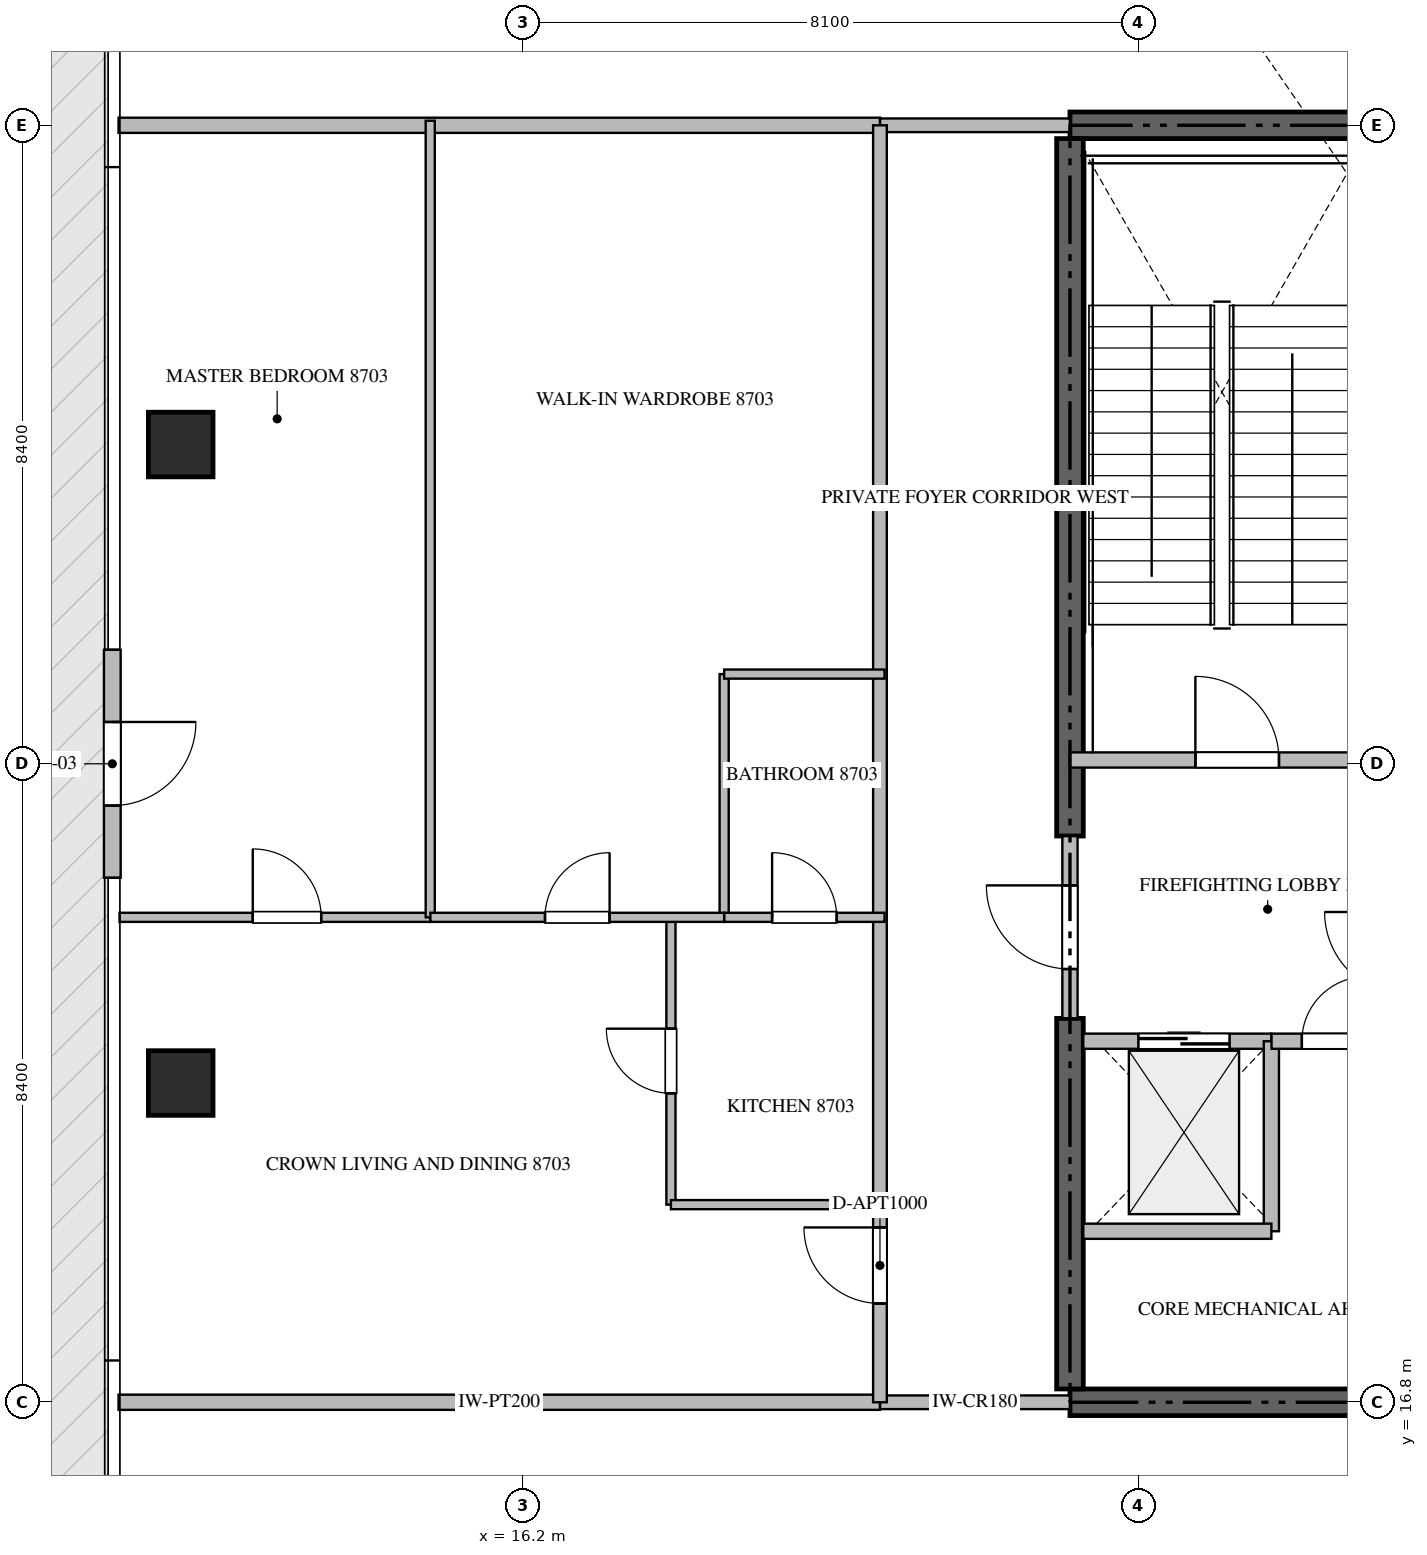
"""IFC4 building model, lengths in metres.
Left out: names, types, materials, properties, quantities, classifications, styles, units other than length and angle.
Written with IfcOpenShell. Run it as: python <this file> out.ifc"""

import sys

from ifc_helpers import new_model, si_unit, direction, frame, frame_2d, origin, origin_2d, place, context, subcontext, project, spatial, rectangle, extrude, source, transform, mapped, element, fill, save


model = new_model("IFC4")
c1 = context("Model", 3, precision=1e-05, world=origin(), true_north=direction((0.0, 1.0)))
c2 = subcontext(c1, "Body", "Model", "MODEL_VIEW")
j1 = project(units=[si_unit("LENGTHUNIT", "METRE"), si_unit("PLANEANGLEUNIT", "RADIAN")], contexts=[c1])
p1 = place(None, origin())
s1 = spatial("IfcSite", under=j1, at=p1, CompositionType="ELEMENT")
p2 = place(p1, origin())
s2 = spatial("IfcBuilding", under=s1, at=p2, CompositionType="ELEMENT")
p3 = place(p2, frame((0.0, 0.0, 353.85)))
s3 = spatial("IfcBuildingStorey", under=s2, at=p3, CompositionType="ELEMENT", Elevation=353.85)
for number, where, z_axis, x_axis in (
    (1, (23.4, 16.8, -0.26), (0.0, 0.0, 1.0), (1.0, 0.0, 0.0)),
    (2, (41.4, 33.6, -0.26), (0.0, 0.0, 1.0), (-1.0, 0.0, 0.0)),
):
    element("IfcWall", number, at=place(p3, frame(where, z_axis=z_axis, x_axis=x_axis)), inside=s3, PredefinedType="SHEAR", context=c2, shape_type="SweptSolid", body=[
        extrude(rectangle(XDim=18.0, YDim=0.35, at=frame_2d((9.0, 0.0))), origin(), (0.0, 0.0, 1.0), 5.798),
    ])
p4 = place(p3, frame((23.4, 16.975, -0.26), z_axis=(0.0, 0.0, 1.0), x_axis=(0.0, 1.0, 0.0)))
e3 = element("IfcWall", 3, at=p4, inside=s3, PredefinedType="SHEAR", context=c2, shape_type="SweptSolid", body=[
    extrude(rectangle(XDim=4.875, YDim=0.35, at=frame_2d((2.438, 0.0))), origin(), (0.0, 0.0, 1.0), 5.798),
])
p5 = place(p3, frame((23.4, 24.25, -0.26), z_axis=(0.0, 0.0, 1.0), x_axis=(0.0, 1.0, 0.0)))
e4 = element("IfcWall", 4, at=p5, inside=s3, PredefinedType="SHEAR", context=c2, shape_type="SweptSolid", body=[
    extrude(rectangle(XDim=9.175, YDim=0.35, at=frame_2d((4.587, 0.0))), origin(), (0.0, 0.0, 1.0), 5.798),
])
m1 = source(origin(), c2, "Body", "SweptSolid", [
    extrude(rectangle(XDim=0.85, YDim=0.85, at=origin_2d()), origin(), (0.0, 0.0, 1.0), 5.8),
])
for number, where, z_axis, x_axis in (
    (5, (11.7, 21.0, -0.26), (0.0, 0.0, 1.0), (1.0, 0.0, 0.0)),
    (6, (11.7, 29.4, -0.26), (0.0, 0.0, 1.0), (1.0, 0.0, 0.0)),
):
    element("IfcColumn", number, at=place(p3, frame(where, z_axis=z_axis, x_axis=x_axis)), inside=s3, PredefinedType="COLUMN", context=c2, shape_type="MappedRepresentation", body=[
        mapped(m1, transform((0.0, 0.0, 0.0), scale=1.0)),
    ])
p6 = place(p3, frame((10.8, 26.7, 0.0), z_axis=(0.0, 0.0, 1.0), x_axis=(0.0, -1.0, 0.0)))
e7 = element("IfcWall", 7, at=p6, inside=s3, PredefinedType="ELEMENTEDWALL", context=c2, shape_type="SweptSolid", body=[
    extrude(rectangle(XDim=3.0, YDim=0.22, at=frame_2d((1.5, 0.0))), origin(), (0.0, 0.0, 1.0), 5.525),
])
p7 = place(p6, frame((0.95, 0.0, 0.0)))
e8 = element("IfcOpeningElement", 8, at=p7, cuts=e7, PredefinedType="OPENING", context=c2, shape_type="SweptSolid", body=[
    extrude(rectangle(XDim=1.1, YDim=2.2, at=frame_2d((0.55, 1.1))), frame((0.0, 0.12, 0.0), z_axis=(0.0, -1.0, 0.0), x_axis=(1.0, 0.0, 0.0)), (0.0, 0.0, 1.0), 0.24),
])
p8 = place(p3, frame((23.4, 25.25, 0.0), z_axis=(0.0, 0.0, 1.0), x_axis=(1.0, 0.0, 0.0)))
e9 = element("IfcWall", 9, at=p8, inside=s3, PredefinedType="STANDARD", context=c2, shape_type="SweptSolid", body=[
    extrude(rectangle(XDim=4.45, YDim=0.2, at=frame_2d((2.225, 0.0))), origin(), (0.0, 0.0, 1.0), 5.54),
])
p9 = place(p8, frame((1.65, 0.0, 0.0)))
e10 = element("IfcOpeningElement", 10, at=p9, cuts=e9, PredefinedType="OPENING", context=c2, shape_type="SweptSolid", body=[
    extrude(rectangle(XDim=1.1, YDim=2.15, at=frame_2d((0.55, 1.075))), frame((0.0, 0.11, 0.0), z_axis=(0.0, -1.0, 0.0), x_axis=(1.0, 0.0, 0.0)), (0.0, 0.0, 1.0), 0.22),
])
p10 = place(p3, frame((23.575, 21.55, 0.0), z_axis=(0.0, 0.0, 1.0), x_axis=(1.0, 0.0, 0.0)))
e11 = element("IfcWall", 11, at=p10, inside=s3, PredefinedType="STANDARD", context=c2, shape_type="SweptSolid", body=[
    extrude(rectangle(XDim=2.475, YDim=0.2, at=frame_2d((1.238, 0.0))), origin(), (0.0, 0.0, 1.0), 5.54),
])
p11 = place(p10, frame((0.725, 0.0, 0.0)))
e12 = element("IfcOpeningElement", 12, at=p11, cuts=e11, PredefinedType="OPENING", context=c2, shape_type="SweptSolid", body=[
    extrude(rectangle(XDim=1.2, YDim=2.2, at=frame_2d((0.6, 1.1))), frame((0.0, 0.11, 0.0), z_axis=(0.0, -1.0, 0.0), x_axis=(1.0, 0.0, 0.0)), (0.0, 0.0, 1.0), 0.22),
])
p12 = place(p3, frame((26.05, 19.05, 0.0), z_axis=(0.0, 0.0, 1.0), x_axis=(0.0, 1.0, 0.0)))
e13 = element("IfcWall", 13, at=p12, inside=s3, PredefinedType="STANDARD", context=c2, shape_type="SweptSolid", body=[
    extrude(rectangle(XDim=2.5, YDim=0.2, at=frame_2d((1.25, 0.0))), origin(), (0.0, 0.0, 1.0), 5.54),
])
p13 = place(p3, frame((23.575, 19.05, 0.0), z_axis=(0.0, 0.0, 1.0), x_axis=(1.0, 0.0, 0.0)))
e14 = element("IfcWall", 14, at=p13, inside=s3, PredefinedType="STANDARD", context=c2, shape_type="SweptSolid", body=[
    extrude(rectangle(XDim=2.475, YDim=0.2, at=frame_2d((1.238, 0.0))), origin(), (0.0, 0.0, 1.0), 5.54),
])
p14 = place(p3, frame((26.052, 21.55, 0.0), z_axis=(0.0, 0.0, 1.0), x_axis=(1.0, 0.0, 0.0)))
e15 = element("IfcWall", 15, at=p14, inside=s3, PredefinedType="STANDARD", context=c2, shape_type="SweptSolid", body=[
    extrude(rectangle(XDim=1.648, YDim=0.2, at=frame_2d((0.824, 0.0))), origin(), (0.0, 0.0, 1.0), 5.54),
])
p15 = place(p14, frame((0.399, 0.0, 0.0)))
e16 = element("IfcOpeningElement", 16, at=p15, cuts=e15, PredefinedType="OPENING", context=c2, shape_type="SweptSolid", body=[
    extrude(rectangle(XDim=0.85, YDim=2.1, at=frame_2d((0.425, 1.05))), frame((0.0, 0.11, 0.0), z_axis=(0.0, -1.0, 0.0), x_axis=(1.0, 0.0, 0.0)), (0.0, 0.0, 1.0), 0.22),
])
p16 = place(p3, frame((23.4, 21.852, 0.0), z_axis=(0.0, 0.0, 1.0), x_axis=(0.0, 1.0, 0.0)))
e17 = element("IfcWall", 17, at=p16, inside=s3, PredefinedType="STANDARD", context=c2, shape_type="SweptSolid", body=[
    extrude(rectangle(XDim=2.396, YDim=0.2, at=frame_2d((1.198, 0.0))), origin(), (0.0, 0.0, 1.0), 5.54),
])
p17 = place(p16, frame((0.648, 0.0, 0.0)))
e18 = element("IfcOpeningElement", 18, at=p17, cuts=e17, PredefinedType="OPENING", context=c2, shape_type="SweptSolid", body=[
    extrude(rectangle(XDim=1.1, YDim=2.15, at=frame_2d((0.55, 1.075))), frame((0.0, 0.11, 0.0), z_axis=(0.0, -1.0, 0.0), x_axis=(1.0, 0.0, 0.0)), (0.0, 0.0, 1.0), 0.22),
])
for number, where, z_axis, x_axis in (
    (19, (10.882, 16.8, 0.0), (0.0, 0.0, 1.0), (1.0, 0.0, 0.0)),
    (20, (10.882, 33.6, 0.0), (0.0, 0.0, 1.0), (1.0, 0.0, 0.0)),
):
    element("IfcWall", number, at=place(p3, frame(where, z_axis=z_axis, x_axis=x_axis)), inside=s3, PredefinedType="PARTITIONING", context=c2, shape_type="SweptSolid", body=[
        extrude(rectangle(XDim=10.018, YDim=0.2, at=frame_2d((5.009, 0.0))), origin(), (0.0, 0.0, 1.0), 5.54),
    ])
for number, where, z_axis, x_axis in (
    (21, (20.902, 16.8, 0.0), (0.0, 0.0, 1.0), (1.0, 0.0, 0.0)),
    (22, (20.902, 33.6, 0.0), (0.0, 0.0, 1.0), (1.0, 0.0, 0.0)),
):
    element("IfcWall", number, at=place(p3, frame(where, z_axis=z_axis, x_axis=x_axis)), inside=s3, PredefinedType="PARTITIONING", context=c2, shape_type="SweptSolid", body=[
        extrude(rectangle(XDim=2.496, YDim=0.18, at=frame_2d((1.248, 0.0))), origin(), (0.0, 0.0, 1.0), 5.54),
    ])
p18 = place(p3, frame((20.9, 16.8, 0.0), z_axis=(0.0, 0.0, 1.0), x_axis=(0.0, 1.0, 0.0)))
e23 = element("IfcWall", 23, at=p18, inside=s3, PredefinedType="PARTITIONING", context=c2, shape_type="SweptSolid", body=[
    extrude(rectangle(XDim=16.8, YDim=0.18, at=frame_2d((8.4, 0.0))), origin(), (0.0, 0.0, 1.0), 5.54),
])
p19 = place(p18, frame((1.3, 0.0, 0.0)))
e24 = element("IfcOpeningElement", 24, at=p19, cuts=e23, PredefinedType="OPENING", context=c2, shape_type="SweptSolid", body=[
    extrude(rectangle(XDim=1.0, YDim=2.15, at=frame_2d((0.5, 1.075))), frame((0.0, 0.1, 0.0), z_axis=(0.0, -1.0, 0.0), x_axis=(1.0, 0.0, 0.0)), (0.0, 0.0, 1.0), 0.2),
])
p20 = place(p3, frame((18.15, 19.4, 0.0), z_axis=(0.0, 0.0, 1.0), x_axis=(0.0, 1.0, 0.0)))
e25 = element("IfcWall", 25, at=p20, inside=s3, PredefinedType="PARTITIONING", context=c2, shape_type="SweptSolid", body=[
    extrude(rectangle(XDim=3.78, YDim=0.12, at=frame_2d((1.89, 0.0))), origin(), (0.0, 0.0, 1.0), 5.54),
])
p21 = place(p20, frame((1.465, 0.0, 0.0)))
e26 = element("IfcOpeningElement", 26, at=p21, cuts=e25, PredefinedType="OPENING", context=c2, shape_type="SweptSolid", body=[
    extrude(rectangle(XDim=0.85, YDim=2.1, at=frame_2d((0.425, 1.05))), frame((0.0, 0.07, 0.0), z_axis=(0.0, -1.0, 0.0), x_axis=(1.0, 0.0, 0.0)), (0.0, 0.0, 1.0), 0.14),
])
p22 = place(p3, frame((18.15, 19.4, 0.0), z_axis=(0.0, 0.0, 1.0), x_axis=(1.0, 0.0, 0.0)))
e27 = element("IfcWall", 27, at=p22, inside=s3, PredefinedType="PARTITIONING", context=c2, shape_type="SweptSolid", body=[
    extrude(rectangle(XDim=2.81, YDim=0.12, at=frame_2d((1.405, 0.0))), origin(), (0.0, 0.0, 1.0), 5.54),
])
p23 = place(p3, frame((10.895, 23.18, 0.0), z_axis=(0.0, 0.0, 1.0), x_axis=(1.0, 0.0, 0.0)))
e28 = element("IfcWall", 28, at=p23, inside=s3, PredefinedType="PARTITIONING", context=c2, shape_type="SweptSolid", body=[
    extrude(rectangle(XDim=4.088, YDim=0.12, at=frame_2d((2.044, 0.0))), origin(), (0.0, 0.0, 1.0), 5.54),
])
p24 = place(p23, frame((1.753, 0.0, 0.0)))
e29 = element("IfcOpeningElement", 29, at=p24, cuts=e28, PredefinedType="OPENING", context=c2, shape_type="SweptSolid", body=[
    extrude(rectangle(XDim=0.9, YDim=2.1, at=frame_2d((0.45, 1.05))), frame((0.0, 0.07, 0.0), z_axis=(0.0, -1.0, 0.0), x_axis=(1.0, 0.0, 0.0)), (0.0, 0.0, 1.0), 0.14),
])
p25 = place(p3, frame((14.983, 23.18, 0.0), z_axis=(0.0, 0.0, 1.0), x_axis=(0.0, 1.0, 0.0)))
e30 = element("IfcWall", 30, at=p25, inside=s3, PredefinedType="PARTITIONING", context=c2, shape_type="SweptSolid", body=[
    extrude(rectangle(XDim=10.48, YDim=0.12, at=frame_2d((5.24, 0.0))), origin(), (0.0, 0.0, 1.0), 5.54),
])
p26 = place(p3, frame((18.85, 23.18, 0.0), z_axis=(0.0, 0.0, 1.0), x_axis=(0.0, 1.0, 0.0)))
e31 = element("IfcWall", 31, at=p26, inside=s3, PredefinedType="PARTITIONING", context=c2, shape_type="SweptSolid", body=[
    extrude(rectangle(XDim=3.2, YDim=0.12, at=frame_2d((1.6, 0.0))), origin(), (0.0, 0.0, 1.0), 5.54),
])
p27 = place(p3, frame((18.85, 26.38, 0.0), z_axis=(0.0, 0.0, 1.0), x_axis=(1.0, 0.0, 0.0)))
e32 = element("IfcWall", 32, at=p27, inside=s3, PredefinedType="PARTITIONING", context=c2, shape_type="SweptSolid", body=[
    extrude(rectangle(XDim=2.11, YDim=0.12, at=frame_2d((1.055, 0.0))), origin(), (0.0, 0.0, 1.0), 5.54),
])
p28 = place(p3, frame((14.985, 23.18, 0.0), z_axis=(0.0, 0.0, 1.0), x_axis=(1.0, 0.0, 0.0)))
e33 = element("IfcWall", 33, at=p28, inside=s3, PredefinedType="PARTITIONING", context=c2, shape_type="SweptSolid", body=[
    extrude(rectangle(XDim=3.865, YDim=0.12, at=frame_2d((1.933, 0.0))), origin(), (0.0, 0.0, 1.0), 5.54),
])
p29 = place(p28, frame((1.508, 0.0, 0.0)))
e34 = element("IfcOpeningElement", 34, at=p29, cuts=e33, PredefinedType="OPENING", context=c2, shape_type="SweptSolid", body=[
    extrude(rectangle(XDim=0.85, YDim=2.1, at=frame_2d((0.425, 1.05))), frame((0.0, 0.07, 0.0), z_axis=(0.0, -1.0, 0.0), x_axis=(1.0, 0.0, 0.0)), (0.0, 0.0, 1.0), 0.14),
])
p30 = place(p3, frame((18.852, 23.18, 0.0), z_axis=(0.0, 0.0, 1.0), x_axis=(1.0, 0.0, 0.0)))
e35 = element("IfcWall", 35, at=p30, inside=s3, PredefinedType="PARTITIONING", context=c2, shape_type="SweptSolid", body=[
    extrude(rectangle(XDim=2.108, YDim=0.12, at=frame_2d((1.054, 0.0))), origin(), (0.0, 0.0, 1.0), 5.54),
])
p31 = place(p30, frame((0.629, 0.0, 0.0)))
e36 = element("IfcOpeningElement", 36, at=p31, cuts=e35, PredefinedType="OPENING", context=c2, shape_type="SweptSolid", body=[
    extrude(rectangle(XDim=0.85, YDim=2.1, at=frame_2d((0.425, 1.05))), frame((0.0, 0.07, 0.0), z_axis=(0.0, -1.0, 0.0), x_axis=(1.0, 0.0, 0.0)), (0.0, 0.0, 1.0), 0.14),
])
m2 = source(origin(), c2, "Body", "SweptSolid", [
    extrude(rectangle(XDim=1.1, YDim=2.2, at=frame_2d((0.55, 1.1))), frame((0.0, 0.025, 0.0), z_axis=(0.0, -1.0, 0.0), x_axis=(1.0, 0.0, 0.0)), (0.0, 0.0, 1.0), 0.05),
])
p32 = place(p7, origin())
e37 = element("IfcDoor", 37, at=p32, inside=s3, OperationType="SINGLE_SWING_LEFT", PredefinedType="DOOR", context=c2, shape_type="MappedRepresentation", body=[
    mapped(m2, transform((0.0, 0.0, 0.0), scale=1.0)),
])
fill(e8, e37)
m3 = source(origin(), c2, "Body", "SweptSolid", [
    extrude(rectangle(XDim=1.1, YDim=2.15, at=frame_2d((0.55, 1.075))), frame((0.0, 0.025, 0.0), z_axis=(0.0, -1.0, 0.0), x_axis=(1.0, 0.0, 0.0)), (0.0, 0.0, 1.0), 0.05),
])
p33 = place(p9, origin())
e38 = element("IfcDoor", 38, at=p33, inside=s3, OperationType="SINGLE_SWING_LEFT", PredefinedType="DOOR", context=c2, shape_type="MappedRepresentation", body=[
    mapped(m3, transform((0.0, 0.0, 0.0), scale=1.0)),
])
fill(e10, e38)
m4 = source(origin(), c2, "Body", "SweptSolid", [
    extrude(rectangle(XDim=1.2, YDim=2.2, at=frame_2d((0.6, 1.1))), frame((0.0, 0.025, 0.0), z_axis=(0.0, -1.0, 0.0), x_axis=(1.0, 0.0, 0.0)), (0.0, 0.0, 1.0), 0.05),
])
p34 = place(p11, origin())
e39 = element("IfcDoor", 39, at=p34, inside=s3, OperationType="DOUBLE_DOOR_SLIDING", PredefinedType="DOOR", context=c2, shape_type="MappedRepresentation", body=[
    mapped(m4, transform((0.0, 0.0, 0.0), scale=1.0)),
])
fill(e12, e39)
m5 = source(origin(), c2, "Body", "SweptSolid", [
    extrude(rectangle(XDim=0.85, YDim=2.1, at=frame_2d((0.425, 1.05))), frame((0.0, 0.025, 0.0), z_axis=(0.0, -1.0, 0.0), x_axis=(1.0, 0.0, 0.0)), (0.0, 0.0, 1.0), 0.05),
])
p35 = place(p15, origin())
e40 = element("IfcDoor", 40, at=p35, inside=s3, OperationType="SINGLE_SWING_RIGHT", PredefinedType="DOOR", context=c2, shape_type="MappedRepresentation", body=[
    mapped(m5, transform((0.0, 0.0, 0.0), scale=1.0)),
])
fill(e16, e40)
p36 = place(p17, origin())
e41 = element("IfcDoor", 41, at=p36, inside=s3, OperationType="SINGLE_SWING_RIGHT", PredefinedType="DOOR", context=c2, shape_type="MappedRepresentation", body=[
    mapped(m3, transform((0.0, 0.0, 0.0), scale=1.0)),
])
fill(e18, e41)
m6 = source(origin(), c2, "Body", "SweptSolid", [
    extrude(rectangle(XDim=1.0, YDim=2.15, at=frame_2d((0.5, 1.075))), frame((0.0, 0.025, 0.0), z_axis=(0.0, -1.0, 0.0), x_axis=(1.0, 0.0, 0.0)), (0.0, 0.0, 1.0), 0.05),
])
p37 = place(p19, origin())
e42 = element("IfcDoor", 42, at=p37, inside=s3, OperationType="SINGLE_SWING_RIGHT", PredefinedType="DOOR", context=c2, shape_type="MappedRepresentation", body=[
    mapped(m6, transform((0.0, 0.0, 0.0), scale=1.0)),
])
fill(e24, e42)
p38 = place(p21, origin())
e43 = element("IfcDoor", 43, at=p38, inside=s3, OperationType="SINGLE_SWING_RIGHT", PredefinedType="DOOR", context=c2, shape_type="MappedRepresentation", body=[
    mapped(m5, transform((0.0, 0.0, 0.0), scale=1.0)),
])
fill(e26, e43)
m7 = source(origin(), c2, "Body", "SweptSolid", [
    extrude(rectangle(XDim=0.9, YDim=2.1, at=frame_2d((0.45, 1.05))), frame((0.0, 0.025, 0.0), z_axis=(0.0, -1.0, 0.0), x_axis=(1.0, 0.0, 0.0)), (0.0, 0.0, 1.0), 0.05),
])
p39 = place(p24, origin())
e44 = element("IfcDoor", 44, at=p39, inside=s3, OperationType="SINGLE_SWING_LEFT", PredefinedType="DOOR", context=c2, shape_type="MappedRepresentation", body=[
    mapped(m7, transform((0.0, 0.0, 0.0), scale=1.0)),
])
fill(e29, e44)
p40 = place(p29, origin())
e45 = element("IfcDoor", 45, at=p40, inside=s3, OperationType="SINGLE_SWING_RIGHT", PredefinedType="DOOR", context=c2, shape_type="MappedRepresentation", body=[
    mapped(m5, transform((0.0, 0.0, 0.0), scale=1.0)),
])
fill(e34, e45)
p41 = place(p31, origin())
e46 = element("IfcDoor", 46, at=p41, inside=s3, OperationType="SINGLE_SWING_LEFT", PredefinedType="DOOR", context=c2, shape_type="MappedRepresentation", body=[
    mapped(m5, transform((0.0, 0.0, 0.0), scale=1.0)),
])
fill(e36, e46)
save(model, sys.argv[1])
